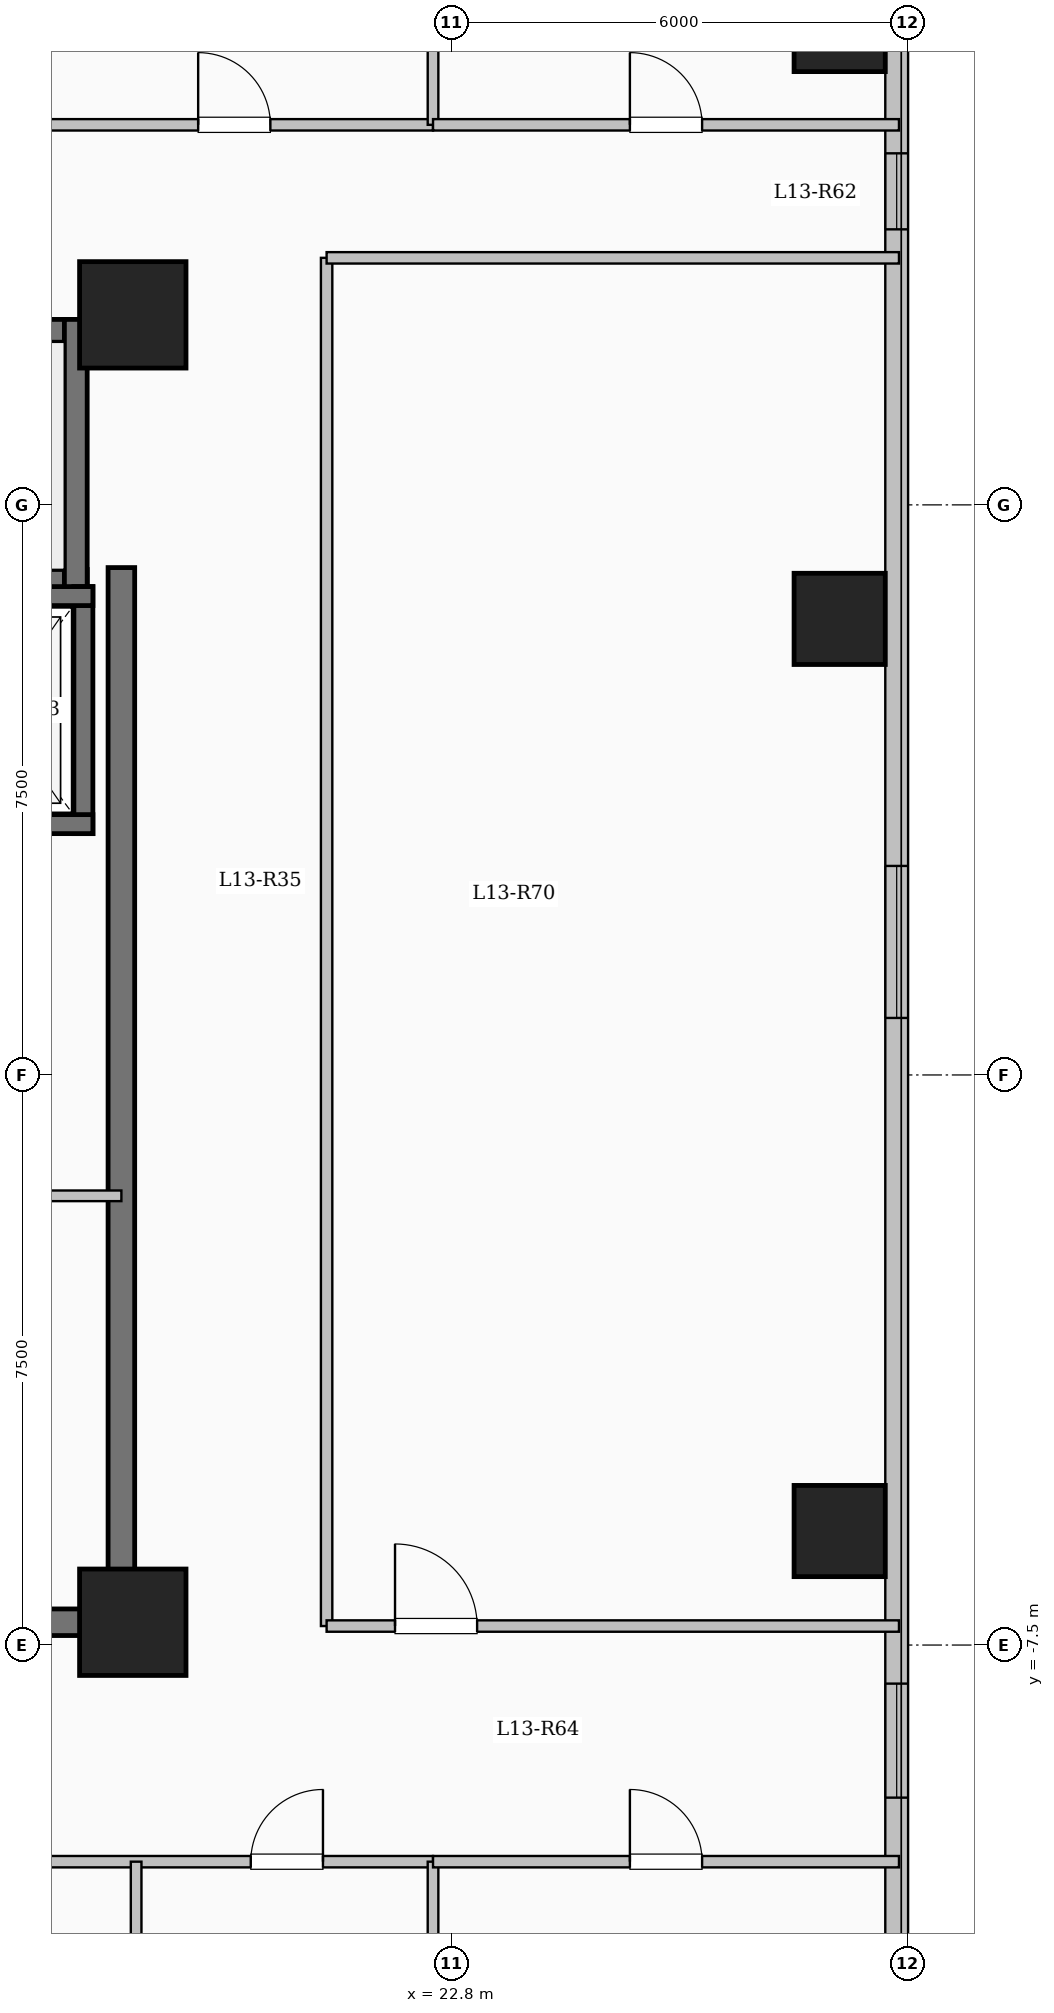
"""IFC4 building model, lengths in metres.
Left out: names, types, materials, properties, quantities, classifications, styles, units other than length and angle.
Written with IfcOpenShell. Run it as: python <this file> out.ifc"""

import sys

from ifc_helpers import new_model, si_unit, direction, frame, frame_2d, origin, origin_2d, place, context, subcontext, project, spatial, rectangle, extrude, element, fill, save


model = new_model("IFC4")
c1 = context("Model", 3, precision=1e-05, world=origin(), true_north=direction((0.0, 1.0)))
c2 = subcontext(c1, "Body", "Model", "MODEL_VIEW")
j1 = project(units=[si_unit("LENGTHUNIT", "METRE"), si_unit("PLANEANGLEUNIT", "RADIAN")], contexts=[c1])
p1 = place(None, origin())
s1 = spatial("IfcSite", under=j1, at=p1, CompositionType="ELEMENT")
p2 = place(p1, origin())
s2 = spatial("IfcBuilding", under=s1, at=p2, CompositionType="ELEMENT")
p3 = place(p2, frame((0.0, 0.0, 50.8)))
s3 = spatial("IfcBuildingStorey", under=s2, at=p3, CompositionType="ELEMENT", Elevation=50.8)
for number, where, z_axis, x_axis in (
    (1, (18.6, -7.2, 0.0), (0.0, 0.0, 1.0), (1.0, 0.0, 0.0)),
    (2, (18.6, 10.0, 0.0), (0.0, 0.0, 1.0), (1.0, 0.0, 0.0)),
):
    element("IfcColumn", number, at=place(p3, frame(where, z_axis=z_axis, x_axis=x_axis)), inside=s3, PredefinedType="COLUMN", context=c2, shape_type="SweptSolid", body=[
        extrude(rectangle(XDim=1.4, YDim=1.4, at=origin_2d()), origin(), (0.0, 0.0, 1.0), 3.35),
    ])
for number, where, z_axis, x_axis in (
    (3, (27.9, -6.0, 0.0), (0.0, 0.0, 1.0), (1.0, 0.0, 0.0)),
    (4, (27.9, 6.0, 0.0), (0.0, 0.0, 1.0), (1.0, 0.0, 0.0)),
    (5, (27.9, 13.8, 0.0), (0.0, 0.0, 1.0), (1.0, 0.0, 0.0)),
):
    element("IfcColumn", number, at=place(p3, frame(where, z_axis=z_axis, x_axis=x_axis)), inside=s3, PredefinedType="COLUMN", context=c2, shape_type="SweptSolid", body=[
        extrude(rectangle(XDim=1.2, YDim=1.2, at=origin_2d()), origin(), (0.0, 0.0, 1.0), 3.35),
    ])
p4 = place(p3, frame((28.65, 19.05, 0.0), z_axis=(0.0, 0.0, 1.0), x_axis=(0.0, -1.0, 0.0)))
e6 = element("IfcWall", 6, at=p4, inside=s3, PredefinedType="SOLIDWALL", context=c2, shape_type="SweptSolid", body=[
    extrude(rectangle(XDim=38.1, YDim=0.3, at=frame_2d((19.05, 0.0))), origin(), (0.0, 0.0, 1.0), 3.1),
])
p5 = place(p4, frame((2.275, 0.0, 0.9)))
e7 = element("IfcOpeningElement", 7, at=p5, cuts=e6, PredefinedType="OPENING", context=c2, shape_type="SweptSolid", body=[
    extrude(rectangle(XDim=2.0, YDim=1.7, at=frame_2d((1.0, 0.85))), frame((0.0, 0.16, 0.0), z_axis=(0.0, -1.0, 0.0), x_axis=(1.0, 0.0, 0.0)), (0.0, 0.0, 1.0), 0.32),
])
p6 = place(p4, frame((6.925, 0.0, 0.95)))
e8 = element("IfcOpeningElement", 8, at=p6, cuts=e6, PredefinedType="OPENING", context=c2, shape_type="SweptSolid", body=[
    extrude(rectangle(XDim=1.0, YDim=1.5, at=frame_2d((0.5, 0.75))), frame((0.0, 0.16, 0.0), z_axis=(0.0, -1.0, 0.0), x_axis=(1.0, 0.0, 0.0)), (0.0, 0.0, 1.0), 0.32),
])
p7 = place(p4, frame((16.3, 0.0, 0.9)))
e9 = element("IfcOpeningElement", 9, at=p7, cuts=e6, PredefinedType="OPENING", context=c2, shape_type="SweptSolid", body=[
    extrude(rectangle(XDim=2.0, YDim=1.7, at=frame_2d((1.0, 0.85))), frame((0.0, 0.16, 0.0), z_axis=(0.0, -1.0, 0.0), x_axis=(1.0, 0.0, 0.0)), (0.0, 0.0, 1.0), 0.32),
])
p8 = place(p4, frame((27.058, 0.0, 0.9)))
e10 = element("IfcOpeningElement", 10, at=p8, cuts=e6, PredefinedType="OPENING", context=c2, shape_type="SweptSolid", body=[
    extrude(rectangle(XDim=1.5, YDim=1.65, at=frame_2d((0.75, 0.825))), frame((0.0, 0.16, 0.0), z_axis=(0.0, -1.0, 0.0), x_axis=(1.0, 0.0, 0.0)), (0.0, 0.0, 1.0), 0.32),
])
p9 = place(p4, frame((32.55, 0.0, 0.9)))
e11 = element("IfcOpeningElement", 11, at=p9, cuts=e6, PredefinedType="OPENING", context=c2, shape_type="SweptSolid", body=[
    extrude(rectangle(XDim=2.4, YDim=1.8, at=frame_2d((1.2, 0.9))), frame((0.0, 0.16, 0.0), z_axis=(0.0, -1.0, 0.0), x_axis=(1.0, 0.0, 0.0)), (0.0, 0.0, 1.0), 0.32),
])
p10 = place(p3, frame((10.0, 9.79, 0.0), z_axis=(0.0, 0.0, 1.0), x_axis=(1.0, 0.0, 0.0)))
e12 = element("IfcWall", 12, at=p10, inside=s3, PredefinedType="SHEAR", context=c2, shape_type="SweptSolid", body=[
    extrude(rectangle(XDim=8.0, YDim=0.3, at=frame_2d((4.0, 0.0))), origin(), (0.0, 0.0, 1.0), 3.35),
])
p11 = place(p3, frame((10.0, 6.5, 0.0), z_axis=(0.0, 0.0, 1.0), x_axis=(1.0, 0.0, 0.0)))
e13 = element("IfcWall", 13, at=p11, inside=s3, PredefinedType="SHEAR", context=c2, shape_type="SweptSolid", body=[
    extrude(rectangle(XDim=8.0, YDim=0.3, at=frame_2d((4.0, 0.0))), origin(), (0.0, 0.0, 1.0), 3.35),
])
p12 = place(p11, frame((0.55, 0.0, 0.0)))
e14 = element("IfcOpeningElement", 14, at=p12, cuts=e13, PredefinedType="OPENING", context=c2, shape_type="SweptSolid", body=[
    extrude(rectangle(XDim=1.0, YDim=2.15, at=frame_2d((0.5, 1.075))), frame((0.0, 0.16, 0.0), z_axis=(0.0, -1.0, 0.0), x_axis=(1.0, 0.0, 0.0)), (0.0, 0.0, 1.0), 0.32),
])
p13 = place(p3, frame((17.85, 6.35, 0.0), z_axis=(0.0, 0.0, 1.0), x_axis=(0.0, 1.0, 0.0)))
e15 = element("IfcWall", 15, at=p13, inside=s3, PredefinedType="SHEAR", context=c2, shape_type="SweptSolid", body=[
    extrude(rectangle(XDim=3.59, YDim=0.3, at=frame_2d((1.795, 0.0))), origin(), (0.0, 0.0, 1.0), 3.35),
])
p14 = place(p3, frame((17.95, 3.175, 0.0), z_axis=(0.0, 0.0, 1.0), x_axis=(0.0, 1.0, 0.0)))
e16 = element("IfcWall", 16, at=p14, inside=s3, PredefinedType="SHEAR", context=c2, shape_type="SweptSolid", body=[
    extrude(rectangle(XDim=3.25, YDim=0.25, at=frame_2d((1.625, 0.0))), origin(), (0.0, 0.0, 1.0), 3.35),
])
for number, where, z_axis, x_axis in (
    (17, (15.525, 3.3, 0.0), (0.0, 0.0, 1.0), (1.0, 0.0, 0.0)),
    (18, (15.525, 6.3, 0.0), (0.0, 0.0, 1.0), (1.0, 0.0, 0.0)),
):
    element("IfcWall", number, at=place(p3, frame(where, z_axis=z_axis, x_axis=x_axis)), inside=s3, PredefinedType="SHEAR", context=c2, shape_type="SweptSolid", body=[
        extrude(rectangle(XDim=2.55, YDim=0.25, at=frame_2d((1.275, 0.0))), origin(), (0.0, 0.0, 1.0), 3.35),
    ])
p15 = place(p3, frame((18.45, -7.375, 0.0), z_axis=(0.0, 0.0, 1.0), x_axis=(0.0, 1.0, 0.0)))
e19 = element("IfcWall", 19, at=p15, inside=s3, PredefinedType="SHEAR", context=c2, shape_type="SweptSolid", body=[
    extrude(rectangle(XDim=14.05, YDim=0.35, at=frame_2d((7.025, 0.0))), origin(), (0.0, 0.0, 1.0), 3.35),
])
p16 = place(p3, frame((10.075, -7.2, 0.0), z_axis=(0.0, 0.0, 1.0), x_axis=(1.0, 0.0, 0.0)))
e20 = element("IfcWall", 20, at=p16, inside=s3, PredefinedType="SHEAR", context=c2, shape_type="SweptSolid", body=[
    extrude(rectangle(XDim=8.55, YDim=0.35, at=frame_2d((4.275, 0.0))), origin(), (0.0, 0.0, 1.0), 3.35),
])
p17 = place(p3, frame((15.4, -1.59, 0.0), z_axis=(0.0, 0.0, 1.0), x_axis=(1.0, 0.0, 0.0)))
e21 = element("IfcWall", 21, at=p17, inside=s3, PredefinedType="PARTITIONING", context=c2, shape_type="SweptSolid", body=[
    extrude(rectangle(XDim=3.05, YDim=0.14, at=frame_2d((1.525, 0.0))), origin(), (0.0, 0.0, 1.0), 3.1),
])
p18 = place(p17, frame((1.05, 0.0, 0.0)))
e22 = element("IfcOpeningElement", 22, at=p18, cuts=e21, PredefinedType="OPENING", context=c2, shape_type="SweptSolid", body=[
    extrude(rectangle(XDim=0.9, YDim=2.08, at=frame_2d((0.45, 1.04))), frame((0.0, 0.08, 0.0), z_axis=(0.0, -1.0, 0.0), x_axis=(1.0, 0.0, 0.0)), (0.0, 0.0, 1.0), 0.16),
])
p19 = place(p3, frame((3.85, 12.5, 0.0), z_axis=(0.0, 0.0, 1.0), x_axis=(1.0, 0.0, 0.0)))
e23 = element("IfcWall", 23, at=p19, inside=s3, PredefinedType="PARTITIONING", context=c2, shape_type="SweptSolid", body=[
    extrude(rectangle(XDim=18.7, YDim=0.15, at=frame_2d((9.35, 0.0))), origin(), (0.0, 0.0, 1.0), 3.1),
])
p20 = place(p19, frame((2.942, 0.0, 0.0)))
e24 = element("IfcOpeningElement", 24, at=p20, cuts=e23, PredefinedType="OPENING", context=c2, shape_type="SweptSolid", body=[
    extrude(rectangle(XDim=0.95, YDim=2.15, at=frame_2d((0.475, 1.075))), frame((0.0, 0.085, 0.0), z_axis=(0.0, -1.0, 0.0), x_axis=(1.0, 0.0, 0.0)), (0.0, 0.0, 1.0), 0.17),
])
p21 = place(p19, frame((9.647, 0.0, 0.0)))
e25 = element("IfcOpeningElement", 25, at=p21, cuts=e23, PredefinedType="OPENING", context=c2, shape_type="SweptSolid", body=[
    extrude(rectangle(XDim=0.95, YDim=2.15, at=frame_2d((0.475, 1.075))), frame((0.0, 0.085, 0.0), z_axis=(0.0, -1.0, 0.0), x_axis=(1.0, 0.0, 0.0)), (0.0, 0.0, 1.0), 0.17),
])
p22 = place(p19, frame((15.61, 0.0, 0.0)))
e26 = element("IfcOpeningElement", 26, at=p22, cuts=e23, PredefinedType="OPENING", context=c2, shape_type="SweptSolid", body=[
    extrude(rectangle(XDim=0.95, YDim=2.15, at=frame_2d((0.475, 1.075))), frame((0.0, 0.085, 0.0), z_axis=(0.0, -1.0, 0.0), x_axis=(1.0, 0.0, 0.0)), (0.0, 0.0, 1.0), 0.17),
])
p23 = place(p3, frame((21.15, -7.25, 0.0), z_axis=(0.0, 0.0, 1.0), x_axis=(0.0, 1.0, 0.0)))
e27 = element("IfcWall", 27, at=p23, inside=s3, PredefinedType="PARTITIONING", context=c2, shape_type="SweptSolid", body=[
    extrude(rectangle(XDim=18.0, YDim=0.15, at=frame_2d((9.0, 0.0))), origin(), (0.0, 0.0, 1.0), 2.585),
])
p24 = place(p3, frame((8.55, -10.35, 0.0), z_axis=(0.0, 0.0, 1.0), x_axis=(1.0, 0.0, 0.0)))
e28 = element("IfcWall", 28, at=p24, inside=s3, PredefinedType="PARTITIONING", context=c2, shape_type="SweptSolid", body=[
    extrude(rectangle(XDim=14.0, YDim=0.15, at=frame_2d((7.0, 0.0))), origin(), (0.0, 0.0, 1.0), 3.1),
])
p25 = place(p24, frame((2.056, 0.0, 0.0)))
e29 = element("IfcOpeningElement", 29, at=p25, cuts=e28, PredefinedType="OPENING", context=c2, shape_type="SweptSolid", body=[
    extrude(rectangle(XDim=0.95, YDim=2.15, at=frame_2d((0.475, 1.075))), frame((0.0, 0.085, 0.0), z_axis=(0.0, -1.0, 0.0), x_axis=(1.0, 0.0, 0.0)), (0.0, 0.0, 1.0), 0.17),
])
p26 = place(p24, frame((7.108, 0.0, 0.0)))
e30 = element("IfcOpeningElement", 30, at=p26, cuts=e28, PredefinedType="OPENING", context=c2, shape_type="SweptSolid", body=[
    extrude(rectangle(XDim=0.95, YDim=2.15, at=frame_2d((0.475, 1.075))), frame((0.0, 0.085, 0.0), z_axis=(0.0, -1.0, 0.0), x_axis=(1.0, 0.0, 0.0)), (0.0, 0.0, 1.0), 0.17),
])
p27 = place(p24, frame((11.602, 0.0, 0.0)))
e31 = element("IfcOpeningElement", 31, at=p27, cuts=e28, PredefinedType="OPENING", context=c2, shape_type="SweptSolid", body=[
    extrude(rectangle(XDim=0.95, YDim=2.15, at=frame_2d((0.475, 1.075))), frame((0.0, 0.085, 0.0), z_axis=(0.0, -1.0, 0.0), x_axis=(1.0, 0.0, 0.0)), (0.0, 0.0, 1.0), 0.17),
])
p28 = place(p3, frame((18.644, -23.55, 0.0), z_axis=(0.0, 0.0, 1.0), x_axis=(0.0, 1.0, 0.0)))
e32 = element("IfcWall", 32, at=p28, inside=s3, PredefinedType="PARTITIONING", context=c2, shape_type="SweptSolid", body=[
    extrude(rectangle(XDim=13.2, YDim=0.14, at=frame_2d((6.6, 0.0))), origin(), (0.0, 0.0, 1.0), 3.1),
])
p29 = place(p3, frame((21.15, -7.25, 0.0), z_axis=(0.0, 0.0, 1.0), x_axis=(1.0, 0.0, 0.0)))
e33 = element("IfcWall", 33, at=p29, inside=s3, PredefinedType="PARTITIONING", context=c2, shape_type="SweptSolid", body=[
    extrude(rectangle(XDim=7.53, YDim=0.15, at=frame_2d((3.765, 0.0))), origin(), (0.0, 0.0, 1.0), 3.1),
])
p30 = place(p29, frame((0.9, 0.0, 0.0)))
e34 = element("IfcOpeningElement", 34, at=p30, cuts=e33, PredefinedType="OPENING", context=c2, shape_type="SweptSolid", body=[
    extrude(rectangle(XDim=1.08, YDim=2.15, at=frame_2d((0.54, 1.075))), frame((0.0, 0.085, 0.0), z_axis=(0.0, -1.0, 0.0), x_axis=(1.0, 0.0, 0.0)), (0.0, 0.0, 1.0), 0.17),
])
p31 = place(p3, frame((21.15, 10.75, 0.0), z_axis=(0.0, 0.0, 1.0), x_axis=(1.0, 0.0, 0.0)))
e35 = element("IfcWall", 35, at=p31, inside=s3, PredefinedType="PARTITIONING", context=c2, shape_type="SweptSolid", body=[
    extrude(rectangle(XDim=7.53, YDim=0.15, at=frame_2d((3.765, 0.0))), origin(), (0.0, 0.0, 1.0), 3.1),
])
p32 = place(p3, frame((22.55, -19.05, 0.0), z_axis=(0.0, 0.0, 1.0), x_axis=(0.0, 1.0, 0.0)))
e36 = element("IfcWall", 36, at=p32, inside=s3, PredefinedType="PARTITIONING", context=c2, shape_type="SweptSolid", body=[
    extrude(rectangle(XDim=8.7, YDim=0.14, at=frame_2d((4.35, 0.0))), origin(), (0.0, 0.0, 1.0), 3.1),
])
p33 = place(p3, frame((22.55, 12.5, 0.0), z_axis=(0.0, 0.0, 1.0), x_axis=(0.0, 1.0, 0.0)))
e37 = element("IfcWall", 37, at=p33, inside=s3, PredefinedType="PARTITIONING", context=c2, shape_type="SweptSolid", body=[
    extrude(rectangle(XDim=6.55, YDim=0.14, at=frame_2d((3.275, 0.0))), origin(), (0.0, 0.0, 1.0), 3.1),
])
p34 = place(p3, frame((22.55, 12.5, 0.0), z_axis=(0.0, 0.0, 1.0), x_axis=(1.0, 0.0, 0.0)))
e38 = element("IfcWall", 38, at=p34, inside=s3, PredefinedType="PARTITIONING", context=c2, shape_type="SweptSolid", body=[
    extrude(rectangle(XDim=6.13, YDim=0.15, at=frame_2d((3.065, 0.0))), origin(), (0.0, 0.0, 1.0), 3.1),
])
p35 = place(p34, frame((2.59, 0.0, 0.0)))
e39 = element("IfcOpeningElement", 39, at=p35, cuts=e38, PredefinedType="OPENING", context=c2, shape_type="SweptSolid", body=[
    extrude(rectangle(XDim=0.95, YDim=2.15, at=frame_2d((0.475, 1.075))), frame((0.0, 0.085, 0.0), z_axis=(0.0, -1.0, 0.0), x_axis=(1.0, 0.0, 0.0)), (0.0, 0.0, 1.0), 0.17),
])
p36 = place(p3, frame((22.55, -10.35, 0.0), z_axis=(0.0, 0.0, 1.0), x_axis=(1.0, 0.0, 0.0)))
e40 = element("IfcWall", 40, at=p36, inside=s3, PredefinedType="PARTITIONING", context=c2, shape_type="SweptSolid", body=[
    extrude(rectangle(XDim=6.13, YDim=0.15, at=frame_2d((3.065, 0.0))), origin(), (0.0, 0.0, 1.0), 3.1),
])
p37 = place(p36, frame((2.59, 0.0, 0.0)))
e41 = element("IfcOpeningElement", 41, at=p37, cuts=e40, PredefinedType="OPENING", context=c2, shape_type="SweptSolid", body=[
    extrude(rectangle(XDim=0.95, YDim=2.15, at=frame_2d((0.475, 1.075))), frame((0.0, 0.085, 0.0), z_axis=(0.0, -1.0, 0.0), x_axis=(1.0, 0.0, 0.0)), (0.0, 0.0, 1.0), 0.17),
])
p38 = place(p6, origin())
e42 = element("IfcWindow", 42, at=p38, inside=s3, PartitioningType="SINGLE_PANEL", PredefinedType="WINDOW", context=c2, shape_type="SweptSolid", body=[
    extrude(rectangle(XDim=1.0, YDim=1.5, at=frame_2d((0.5, 0.75))), frame((0.0, 0.03, 0.0), z_axis=(0.0, -1.0, 0.0), x_axis=(1.0, 0.0, 0.0)), (0.0, 0.0, 1.0), 0.06),
])
fill(e8, e42)
p39 = place(p7, origin())
e43 = element("IfcWindow", 43, at=p39, inside=s3, PartitioningType="SINGLE_PANEL", PredefinedType="WINDOW", context=c2, shape_type="SweptSolid", body=[
    extrude(rectangle(XDim=2.0, YDim=1.7, at=frame_2d((1.0, 0.85))), frame((0.0, 0.03, 0.0), z_axis=(0.0, -1.0, 0.0), x_axis=(1.0, 0.0, 0.0)), (0.0, 0.0, 1.0), 0.06),
])
fill(e9, e43)
p40 = place(p8, origin())
e44 = element("IfcWindow", 44, at=p40, inside=s3, PartitioningType="SINGLE_PANEL", PredefinedType="WINDOW", context=c2, shape_type="SweptSolid", body=[
    extrude(rectangle(XDim=1.5, YDim=1.65, at=frame_2d((0.75, 0.825))), frame((0.0, 0.03, 0.0), z_axis=(0.0, -1.0, 0.0), x_axis=(1.0, 0.0, 0.0)), (0.0, 0.0, 1.0), 0.06),
])
fill(e10, e44)
p41 = place(p22, origin())
e45 = element("IfcDoor", 45, at=p41, inside=s3, OperationType="SINGLE_SWING_LEFT", PredefinedType="DOOR", context=c2, shape_type="SweptSolid", body=[
    extrude(rectangle(XDim=0.95, YDim=2.15, at=frame_2d((0.475, 1.075))), frame((0.0, 0.025, 0.0), z_axis=(0.0, -1.0, 0.0), x_axis=(1.0, 0.0, 0.0)), (0.0, 0.0, 1.0), 0.05),
])
fill(e26, e45)
p42 = place(p27, origin())
e46 = element("IfcDoor", 46, at=p42, inside=s3, OperationType="SINGLE_SWING_RIGHT", PredefinedType="DOOR", context=c2, shape_type="SweptSolid", body=[
    extrude(rectangle(XDim=0.95, YDim=2.15, at=frame_2d((0.475, 1.075))), frame((0.0, 0.025, 0.0), z_axis=(0.0, -1.0, 0.0), x_axis=(1.0, 0.0, 0.0)), (0.0, 0.0, 1.0), 0.05),
])
fill(e31, e46)
p43 = place(p35, origin())
e47 = element("IfcDoor", 47, at=p43, inside=s3, OperationType="SINGLE_SWING_LEFT", PredefinedType="DOOR", context=c2, shape_type="SweptSolid", body=[
    extrude(rectangle(XDim=0.95, YDim=2.15, at=frame_2d((0.475, 1.075))), frame((0.0, 0.025, 0.0), z_axis=(0.0, -1.0, 0.0), x_axis=(1.0, 0.0, 0.0)), (0.0, 0.0, 1.0), 0.05),
])
fill(e39, e47)
p44 = place(p37, origin())
e48 = element("IfcDoor", 48, at=p44, inside=s3, OperationType="SINGLE_SWING_LEFT", PredefinedType="DOOR", context=c2, shape_type="SweptSolid", body=[
    extrude(rectangle(XDim=0.95, YDim=2.15, at=frame_2d((0.475, 1.075))), frame((0.0, 0.025, 0.0), z_axis=(0.0, -1.0, 0.0), x_axis=(1.0, 0.0, 0.0)), (0.0, 0.0, 1.0), 0.05),
])
fill(e41, e48)
p45 = place(p30, origin())
e49 = element("IfcDoor", 49, at=p45, inside=s3, OperationType="SINGLE_SWING_LEFT", PredefinedType="DOOR", context=c2, shape_type="SweptSolid", body=[
    extrude(rectangle(XDim=1.08, YDim=2.15, at=frame_2d((0.54, 1.075))), frame((0.0, 0.025, 0.0), z_axis=(0.0, -1.0, 0.0), x_axis=(1.0, 0.0, 0.0)), (0.0, 0.0, 1.0), 0.05),
])
fill(e34, e49)
save(model, sys.argv[1])
